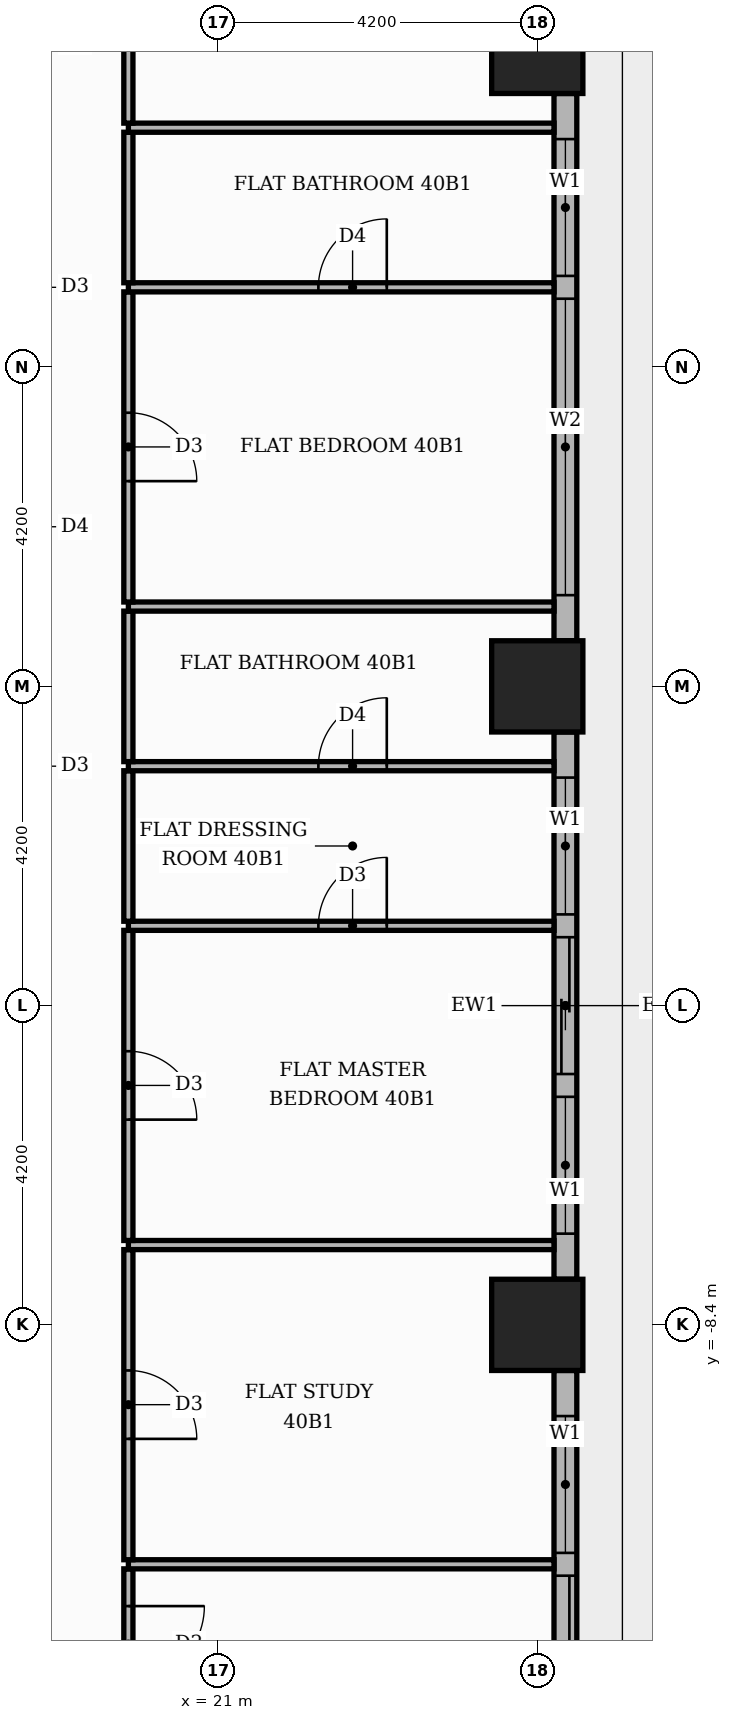
"""IFC4 building model, lengths in metres.
Left out: names, types, materials, properties, quantities, classifications, styles, units other than length and angle.
Written with IfcOpenShell. Run it as: python <this file> out.ifc"""

import sys

from ifc_helpers import new_model, si_unit, direction, frame, frame_2d, origin, origin_2d, place, context, subcontext, project, spatial, rectangle, extrude, element, fill, save


model = new_model("IFC4")
c1 = context("Model", 3, precision=1e-05, world=origin(), true_north=direction((0.0, 1.0)))
c2 = subcontext(c1, "Body", "Model", "MODEL_VIEW")
j1 = project(units=[si_unit("LENGTHUNIT", "METRE"), si_unit("PLANEANGLEUNIT", "RADIAN")], contexts=[c1])
p1 = place(None, origin())
s1 = spatial("IfcSite", under=j1, at=p1, CompositionType="ELEMENT")
p2 = place(p1, origin())
s2 = spatial("IfcBuilding", under=s1, at=p2, CompositionType="ELEMENT")
p3 = place(p2, frame((0.0, 0.0, 168.9)))
s3 = spatial("IfcBuildingStorey", under=s2, at=p3, CompositionType="ELEMENT", Elevation=168.9)
for number, where, z_axis, x_axis in (
    (1, (25.2, 0.0, 0.0), (0.0, 0.0, 1.0), (1.0, 0.0, 0.0)),
    (2, (25.2, 8.4, 0.0), (0.0, 0.0, 1.0), (1.0, 0.0, 0.0)),
    (3, (25.2, -8.4, 0.0), (0.0, 0.0, 1.0), (1.0, 0.0, 0.0)),
):
    element("IfcColumn", number, at=place(p3, frame(where, z_axis=z_axis, x_axis=x_axis)), inside=s3, PredefinedType="COLUMN", context=c2, shape_type="SweptSolid", body=[
        extrude(rectangle(XDim=1.2, YDim=1.2, at=origin_2d()), origin(), (0.0, 0.0, 1.0), 3.9),
    ])
p4 = place(p3, frame((25.57, -16.2, 0.0), z_axis=(0.0, 0.0, 1.0), x_axis=(0.0, 1.0, 0.0)))
e4 = element("IfcWall", 4, at=p4, inside=s3, PredefinedType="STANDARD", context=c2, shape_type="SweptSolid", body=[
    extrude(rectangle(XDim=7.2, YDim=0.3, at=frame_2d((3.6, 0.0))), origin(), (0.0, 0.0, 1.0), 3.48),
])
p5 = place(p4, frame((0.6, 0.0, 0.0)))
e5 = element("IfcOpeningElement", 5, at=p5, cuts=e4, PredefinedType="OPENING", context=c2, shape_type="SweptSolid", body=[
    extrude(rectangle(XDim=3.9, YDim=2.4, at=frame_2d((1.95, 1.2))), frame((0.0, 0.16, 0.0), z_axis=(0.0, -1.0, 0.0), x_axis=(1.0, 0.0, 0.0)), (0.0, 0.0, 1.0), 0.32),
])
p6 = place(p4, frame((4.8, 0.0, 0.9)))
e6 = element("IfcOpeningElement", 6, at=p6, cuts=e4, PredefinedType="OPENING", context=c2, shape_type="SweptSolid", body=[
    extrude(rectangle(XDim=1.8, YDim=2.1, at=frame_2d((0.9, 1.05))), frame((0.0, 0.16, 0.0), z_axis=(0.0, -1.0, 0.0), x_axis=(1.0, 0.0, 0.0)), (0.0, 0.0, 1.0), 0.32),
])
p7 = place(p3, frame((25.57, -7.8, 0.0), z_axis=(0.0, 0.0, 1.0), x_axis=(0.0, 1.0, 0.0)))
e7 = element("IfcWall", 7, at=p7, inside=s3, PredefinedType="STANDARD", context=c2, shape_type="SweptSolid", body=[
    extrude(rectangle(XDim=7.2, YDim=0.3, at=frame_2d((3.6, 0.0))), origin(), (0.0, 0.0, 1.0), 3.48),
])
p8 = place(p7, frame((0.6, 0.0, 0.9)))
e8 = element("IfcOpeningElement", 8, at=p8, cuts=e7, PredefinedType="OPENING", context=c2, shape_type="SweptSolid", body=[
    extrude(rectangle(XDim=1.8, YDim=2.1, at=frame_2d((0.9, 1.05))), frame((0.0, 0.16, 0.0), z_axis=(0.0, -1.0, 0.0), x_axis=(1.0, 0.0, 0.0)), (0.0, 0.0, 1.0), 0.32),
])
p9 = place(p7, frame((2.7, 0.0, 0.0)))
e9 = element("IfcOpeningElement", 9, at=p9, cuts=e7, PredefinedType="OPENING", context=c2, shape_type="SweptSolid", body=[
    extrude(rectangle(XDim=1.8, YDim=2.4, at=frame_2d((0.9, 1.2))), frame((0.0, 0.16, 0.0), z_axis=(0.0, -1.0, 0.0), x_axis=(1.0, 0.0, 0.0)), (0.0, 0.0, 1.0), 0.32),
])
p10 = place(p7, frame((4.8, 0.0, 0.9)))
e10 = element("IfcOpeningElement", 10, at=p10, cuts=e7, PredefinedType="OPENING", context=c2, shape_type="SweptSolid", body=[
    extrude(rectangle(XDim=1.8, YDim=2.1, at=frame_2d((0.9, 1.05))), frame((0.0, 0.16, 0.0), z_axis=(0.0, -1.0, 0.0), x_axis=(1.0, 0.0, 0.0)), (0.0, 0.0, 1.0), 0.32),
])
p11 = place(p3, frame((25.57, 0.6, 0.0), z_axis=(0.0, 0.0, 1.0), x_axis=(0.0, 1.0, 0.0)))
e11 = element("IfcWall", 11, at=p11, inside=s3, PredefinedType="STANDARD", context=c2, shape_type="SweptSolid", body=[
    extrude(rectangle(XDim=7.2, YDim=0.3, at=frame_2d((3.6, 0.0))), origin(), (0.0, 0.0, 1.0), 3.48),
])
p12 = place(p11, frame((0.6, 0.0, 0.9)))
e12 = element("IfcOpeningElement", 12, at=p12, cuts=e11, PredefinedType="OPENING", context=c2, shape_type="SweptSolid", body=[
    extrude(rectangle(XDim=3.9, YDim=2.1, at=frame_2d((1.95, 1.05))), frame((0.0, 0.16, 0.0), z_axis=(0.0, -1.0, 0.0), x_axis=(1.0, 0.0, 0.0)), (0.0, 0.0, 1.0), 0.32),
])
p13 = place(p11, frame((4.8, 0.0, 0.9)))
e13 = element("IfcOpeningElement", 13, at=p13, cuts=e11, PredefinedType="OPENING", context=c2, shape_type="SweptSolid", body=[
    extrude(rectangle(XDim=1.8, YDim=2.1, at=frame_2d((0.9, 1.05))), frame((0.0, 0.16, 0.0), z_axis=(0.0, -1.0, 0.0), x_axis=(1.0, 0.0, 0.0)), (0.0, 0.0, 1.0), 0.32),
])
p14 = place(p3, frame((19.82, -13.59, 0.0), z_axis=(0.0, 0.0, 1.0), x_axis=(0.0, 1.0, 0.0)))
e14 = element("IfcWall", 14, at=p14, inside=s3, PredefinedType="PARTITIONING", context=c2, shape_type="SweptSolid", body=[
    extrude(rectangle(XDim=1.98, YDim=0.12, at=frame_2d((0.99, 0.0))), origin(), (0.0, 0.0, 1.0), 3.48),
])
p15 = place(p14, frame((0.49, 0.0, 0.0)))
e15 = element("IfcOpeningElement", 15, at=p15, cuts=e14, PredefinedType="OPENING", context=c2, shape_type="SweptSolid", body=[
    extrude(rectangle(XDim=1.0, YDim=2.1, at=frame_2d((0.5, 1.05))), frame((0.0, 0.07, 0.0), z_axis=(0.0, -1.0, 0.0), x_axis=(1.0, 0.0, 0.0)), (0.0, 0.0, 1.0), 0.14),
])
p16 = place(p3, frame((19.82, -11.55, 0.0), z_axis=(0.0, 0.0, 1.0), x_axis=(1.0, 0.0, 0.0)))
e16 = element("IfcWall", 16, at=p16, inside=s3, PredefinedType="PARTITIONING", context=c2, shape_type="SweptSolid", body=[
    extrude(rectangle(XDim=5.6, YDim=0.12, at=frame_2d((2.8, 0.0))), origin(), (0.0, 0.0, 1.0), 3.48),
])
p17 = place(p3, frame((19.82, -11.49, 0.0), z_axis=(0.0, 0.0, 1.0), x_axis=(0.0, 1.0, 0.0)))
e17 = element("IfcWall", 17, at=p17, inside=s3, PredefinedType="PARTITIONING", context=c2, shape_type="SweptSolid", body=[
    extrude(rectangle(XDim=4.08, YDim=0.12, at=frame_2d((2.04, 0.0))), origin(), (0.0, 0.0, 1.0), 3.48),
])
p18 = place(p17, frame((1.59, 0.0, 0.0)))
e18 = element("IfcOpeningElement", 18, at=p18, cuts=e17, PredefinedType="OPENING", context=c2, shape_type="SweptSolid", body=[
    extrude(rectangle(XDim=0.9, YDim=2.1, at=frame_2d((0.45, 1.05))), frame((0.0, 0.07, 0.0), z_axis=(0.0, -1.0, 0.0), x_axis=(1.0, 0.0, 0.0)), (0.0, 0.0, 1.0), 0.14),
])
p19 = place(p3, frame((19.82, -7.35, 0.0), z_axis=(0.0, 0.0, 1.0), x_axis=(1.0, 0.0, 0.0)))
e19 = element("IfcWall", 19, at=p19, inside=s3, PredefinedType="PARTITIONING", context=c2, shape_type="SweptSolid", body=[
    extrude(rectangle(XDim=5.6, YDim=0.12, at=frame_2d((2.8, 0.0))), origin(), (0.0, 0.0, 1.0), 3.48),
])
p20 = place(p3, frame((19.82, -7.29, 0.0), z_axis=(0.0, 0.0, 1.0), x_axis=(0.0, 1.0, 0.0)))
e20 = element("IfcWall", 20, at=p20, inside=s3, PredefinedType="PARTITIONING", context=c2, shape_type="SweptSolid", body=[
    extrude(rectangle(XDim=4.08, YDim=0.12, at=frame_2d((2.04, 0.0))), origin(), (0.0, 0.0, 1.0), 3.48),
])
p21 = place(p20, frame((1.59, 0.0, 0.0)))
e21 = element("IfcOpeningElement", 21, at=p21, cuts=e20, PredefinedType="OPENING", context=c2, shape_type="SweptSolid", body=[
    extrude(rectangle(XDim=0.9, YDim=2.1, at=frame_2d((0.45, 1.05))), frame((0.0, 0.07, 0.0), z_axis=(0.0, -1.0, 0.0), x_axis=(1.0, 0.0, 0.0)), (0.0, 0.0, 1.0), 0.14),
])
p22 = place(p3, frame((19.82, -3.15, 0.0), z_axis=(0.0, 0.0, 1.0), x_axis=(1.0, 0.0, 0.0)))
e22 = element("IfcWall", 22, at=p22, inside=s3, PredefinedType="PARTITIONING", context=c2, shape_type="SweptSolid", body=[
    extrude(rectangle(XDim=5.6, YDim=0.12, at=frame_2d((2.8, 0.0))), origin(), (0.0, 0.0, 1.0), 3.48),
])
p23 = place(p22, frame((2.5, 0.0, 0.0)))
e23 = element("IfcOpeningElement", 23, at=p23, cuts=e22, PredefinedType="OPENING", context=c2, shape_type="SweptSolid", body=[
    extrude(rectangle(XDim=0.9, YDim=2.1, at=frame_2d((0.45, 1.05))), frame((0.0, 0.07, 0.0), z_axis=(0.0, -1.0, 0.0), x_axis=(1.0, 0.0, 0.0)), (0.0, 0.0, 1.0), 0.14),
])
p24 = place(p3, frame((19.82, -3.09, 0.0), z_axis=(0.0, 0.0, 1.0), x_axis=(0.0, 1.0, 0.0)))
e24 = element("IfcWall", 24, at=p24, inside=s3, PredefinedType="PARTITIONING", context=c2, shape_type="SweptSolid", body=[
    extrude(rectangle(XDim=1.98, YDim=0.12, at=frame_2d((0.99, 0.0))), origin(), (0.0, 0.0, 1.0), 3.48),
])
p25 = place(p3, frame((19.82, -1.05, 0.0), z_axis=(0.0, 0.0, 1.0), x_axis=(1.0, 0.0, 0.0)))
e25 = element("IfcWall", 25, at=p25, inside=s3, PredefinedType="PARTITIONING", context=c2, shape_type="SweptSolid", body=[
    extrude(rectangle(XDim=5.6, YDim=0.12, at=frame_2d((2.8, 0.0))), origin(), (0.0, 0.0, 1.0), 3.48),
])
p26 = place(p25, frame((2.5, 0.0, 0.0)))
e26 = element("IfcOpeningElement", 26, at=p26, cuts=e25, PredefinedType="OPENING", context=c2, shape_type="SweptSolid", body=[
    extrude(rectangle(XDim=0.9, YDim=2.1, at=frame_2d((0.45, 1.05))), frame((0.0, 0.07, 0.0), z_axis=(0.0, -1.0, 0.0), x_axis=(1.0, 0.0, 0.0)), (0.0, 0.0, 1.0), 0.14),
])
p27 = place(p3, frame((19.82, -0.99, 0.0), z_axis=(0.0, 0.0, 1.0), x_axis=(0.0, 1.0, 0.0)))
e27 = element("IfcWall", 27, at=p27, inside=s3, PredefinedType="PARTITIONING", context=c2, shape_type="SweptSolid", body=[
    extrude(rectangle(XDim=1.98, YDim=0.12, at=frame_2d((0.99, 0.0))), origin(), (0.0, 0.0, 1.0), 3.48),
])
p28 = place(p3, frame((19.82, 1.05, 0.0), z_axis=(0.0, 0.0, 1.0), x_axis=(1.0, 0.0, 0.0)))
e28 = element("IfcWall", 28, at=p28, inside=s3, PredefinedType="PARTITIONING", context=c2, shape_type="SweptSolid", body=[
    extrude(rectangle(XDim=5.6, YDim=0.12, at=frame_2d((2.8, 0.0))), origin(), (0.0, 0.0, 1.0), 3.48),
])
p29 = place(p3, frame((19.82, 1.11, 0.0), z_axis=(0.0, 0.0, 1.0), x_axis=(0.0, 1.0, 0.0)))
e29 = element("IfcWall", 29, at=p29, inside=s3, PredefinedType="PARTITIONING", context=c2, shape_type="SweptSolid", body=[
    extrude(rectangle(XDim=4.08, YDim=0.12, at=frame_2d((2.04, 0.0))), origin(), (0.0, 0.0, 1.0), 3.48),
])
p30 = place(p29, frame((1.59, 0.0, 0.0)))
e30 = element("IfcOpeningElement", 30, at=p30, cuts=e29, PredefinedType="OPENING", context=c2, shape_type="SweptSolid", body=[
    extrude(rectangle(XDim=0.9, YDim=2.1, at=frame_2d((0.45, 1.05))), frame((0.0, 0.07, 0.0), z_axis=(0.0, -1.0, 0.0), x_axis=(1.0, 0.0, 0.0)), (0.0, 0.0, 1.0), 0.14),
])
p31 = place(p3, frame((19.82, 5.25, 0.0), z_axis=(0.0, 0.0, 1.0), x_axis=(1.0, 0.0, 0.0)))
e31 = element("IfcWall", 31, at=p31, inside=s3, PredefinedType="PARTITIONING", context=c2, shape_type="SweptSolid", body=[
    extrude(rectangle(XDim=5.6, YDim=0.12, at=frame_2d((2.8, 0.0))), origin(), (0.0, 0.0, 1.0), 3.48),
])
p32 = place(p31, frame((2.5, 0.0, 0.0)))
e32 = element("IfcOpeningElement", 32, at=p32, cuts=e31, PredefinedType="OPENING", context=c2, shape_type="SweptSolid", body=[
    extrude(rectangle(XDim=0.9, YDim=2.1, at=frame_2d((0.45, 1.05))), frame((0.0, 0.07, 0.0), z_axis=(0.0, -1.0, 0.0), x_axis=(1.0, 0.0, 0.0)), (0.0, 0.0, 1.0), 0.14),
])
p33 = place(p3, frame((19.82, 5.31, 0.0), z_axis=(0.0, 0.0, 1.0), x_axis=(0.0, 1.0, 0.0)))
e33 = element("IfcWall", 33, at=p33, inside=s3, PredefinedType="PARTITIONING", context=c2, shape_type="SweptSolid", body=[
    extrude(rectangle(XDim=1.98, YDim=0.12, at=frame_2d((0.99, 0.0))), origin(), (0.0, 0.0, 1.0), 3.48),
])
p34 = place(p3, frame((19.82, 7.35, 0.0), z_axis=(0.0, 0.0, 1.0), x_axis=(1.0, 0.0, 0.0)))
e34 = element("IfcWall", 34, at=p34, inside=s3, PredefinedType="PARTITIONING", context=c2, shape_type="SweptSolid", body=[
    extrude(rectangle(XDim=5.6, YDim=0.12, at=frame_2d((2.8, 0.0))), origin(), (0.0, 0.0, 1.0), 3.48),
])
p35 = place(p3, frame((19.82, 7.41, 0.0), z_axis=(0.0, 0.0, 1.0), x_axis=(0.0, 1.0, 0.0)))
e35 = element("IfcWall", 35, at=p35, inside=s3, PredefinedType="PARTITIONING", context=c2, shape_type="SweptSolid", body=[
    extrude(rectangle(XDim=4.08, YDim=0.12, at=frame_2d((2.04, 0.0))), origin(), (0.0, 0.0, 1.0), 3.48),
])
p36 = place(p35, frame((1.59, 0.0, 0.0)))
e36 = element("IfcOpeningElement", 36, at=p36, cuts=e35, PredefinedType="OPENING", context=c2, shape_type="SweptSolid", body=[
    extrude(rectangle(XDim=0.9, YDim=2.1, at=frame_2d((0.45, 1.05))), frame((0.0, 0.07, 0.0), z_axis=(0.0, -1.0, 0.0), x_axis=(1.0, 0.0, 0.0)), (0.0, 0.0, 1.0), 0.14),
])
p37 = place(p5, origin())
e37 = element("IfcDoor", 37, at=p37, inside=s3, OperationType="SLIDING_TO_LEFT", PredefinedType="DOOR", context=c2, shape_type="SweptSolid", body=[
    extrude(rectangle(XDim=3.9, YDim=2.4, at=frame_2d((1.95, 1.2))), frame((0.0, 0.025, 0.0), z_axis=(0.0, -1.0, 0.0), x_axis=(1.0, 0.0, 0.0)), (0.0, 0.0, 1.0), 0.05),
])
fill(e5, e37)
p38 = place(p6, origin())
e38 = element("IfcWindow", 38, at=p38, inside=s3, PartitioningType="SINGLE_PANEL", PredefinedType="WINDOW", context=c2, shape_type="SweptSolid", body=[
    extrude(rectangle(XDim=1.8, YDim=2.1, at=frame_2d((0.9, 1.05))), frame((0.0, 0.03, 0.0), z_axis=(0.0, -1.0, 0.0), x_axis=(1.0, 0.0, 0.0)), (0.0, 0.0, 1.0), 0.06),
])
fill(e6, e38)
p39 = place(p8, origin())
e39 = element("IfcWindow", 39, at=p39, inside=s3, PartitioningType="SINGLE_PANEL", PredefinedType="WINDOW", context=c2, shape_type="SweptSolid", body=[
    extrude(rectangle(XDim=1.8, YDim=2.1, at=frame_2d((0.9, 1.05))), frame((0.0, 0.03, 0.0), z_axis=(0.0, -1.0, 0.0), x_axis=(1.0, 0.0, 0.0)), (0.0, 0.0, 1.0), 0.06),
])
fill(e8, e39)
p40 = place(p9, origin())
e40 = element("IfcDoor", 40, at=p40, inside=s3, OperationType="SLIDING_TO_LEFT", PredefinedType="DOOR", context=c2, shape_type="SweptSolid", body=[
    extrude(rectangle(XDim=1.8, YDim=2.4, at=frame_2d((0.9, 1.2))), frame((0.0, 0.025, 0.0), z_axis=(0.0, -1.0, 0.0), x_axis=(1.0, 0.0, 0.0)), (0.0, 0.0, 1.0), 0.05),
])
fill(e9, e40)
p41 = place(p10, origin())
e41 = element("IfcWindow", 41, at=p41, inside=s3, PartitioningType="SINGLE_PANEL", PredefinedType="WINDOW", context=c2, shape_type="SweptSolid", body=[
    extrude(rectangle(XDim=1.8, YDim=2.1, at=frame_2d((0.9, 1.05))), frame((0.0, 0.03, 0.0), z_axis=(0.0, -1.0, 0.0), x_axis=(1.0, 0.0, 0.0)), (0.0, 0.0, 1.0), 0.06),
])
fill(e10, e41)
p42 = place(p12, origin())
e42 = element("IfcWindow", 42, at=p42, inside=s3, PartitioningType="SINGLE_PANEL", PredefinedType="WINDOW", context=c2, shape_type="SweptSolid", body=[
    extrude(rectangle(XDim=3.9, YDim=2.1, at=frame_2d((1.95, 1.05))), frame((0.0, 0.03, 0.0), z_axis=(0.0, -1.0, 0.0), x_axis=(1.0, 0.0, 0.0)), (0.0, 0.0, 1.0), 0.06),
])
fill(e12, e42)
p43 = place(p13, origin())
e43 = element("IfcWindow", 43, at=p43, inside=s3, PartitioningType="SINGLE_PANEL", PredefinedType="WINDOW", context=c2, shape_type="SweptSolid", body=[
    extrude(rectangle(XDim=1.8, YDim=2.1, at=frame_2d((0.9, 1.05))), frame((0.0, 0.03, 0.0), z_axis=(0.0, -1.0, 0.0), x_axis=(1.0, 0.0, 0.0)), (0.0, 0.0, 1.0), 0.06),
])
fill(e13, e43)
p44 = place(p15, frame((1.0, 0.0, 0.0), z_axis=(0.0, 0.0, 1.0), x_axis=(-1.0, 0.0, 0.0)))
e44 = element("IfcDoor", 44, at=p44, inside=s3, OperationType="SINGLE_SWING_RIGHT", PredefinedType="DOOR", context=c2, shape_type="SweptSolid", body=[
    extrude(rectangle(XDim=1.0, YDim=2.1, at=frame_2d((0.5, 1.05))), frame((0.0, 0.025, 0.0), z_axis=(0.0, -1.0, 0.0), x_axis=(1.0, 0.0, 0.0)), (0.0, 0.0, 1.0), 0.05),
])
fill(e15, e44)
p45 = place(p18, frame((0.9, 0.0, 0.0), z_axis=(0.0, 0.0, 1.0), x_axis=(-1.0, 0.0, 0.0)))
e45 = element("IfcDoor", 45, at=p45, inside=s3, OperationType="SINGLE_SWING_LEFT", PredefinedType="DOOR", context=c2, shape_type="SweptSolid", body=[
    extrude(rectangle(XDim=0.9, YDim=2.1, at=frame_2d((0.45, 1.05))), frame((0.0, 0.025, 0.0), z_axis=(0.0, -1.0, 0.0), x_axis=(1.0, 0.0, 0.0)), (0.0, 0.0, 1.0), 0.05),
])
fill(e18, e45)
p46 = place(p21, frame((0.9, 0.0, 0.0), z_axis=(0.0, 0.0, 1.0), x_axis=(-1.0, 0.0, 0.0)))
e46 = element("IfcDoor", 46, at=p46, inside=s3, OperationType="SINGLE_SWING_LEFT", PredefinedType="DOOR", context=c2, shape_type="SweptSolid", body=[
    extrude(rectangle(XDim=0.9, YDim=2.1, at=frame_2d((0.45, 1.05))), frame((0.0, 0.025, 0.0), z_axis=(0.0, -1.0, 0.0), x_axis=(1.0, 0.0, 0.0)), (0.0, 0.0, 1.0), 0.05),
])
fill(e21, e46)
p47 = place(p23, origin())
e47 = element("IfcDoor", 47, at=p47, inside=s3, OperationType="SINGLE_SWING_RIGHT", PredefinedType="DOOR", context=c2, shape_type="SweptSolid", body=[
    extrude(rectangle(XDim=0.9, YDim=2.1, at=frame_2d((0.45, 1.05))), frame((0.0, 0.025, 0.0), z_axis=(0.0, -1.0, 0.0), x_axis=(1.0, 0.0, 0.0)), (0.0, 0.0, 1.0), 0.05),
])
fill(e23, e47)
p48 = place(p26, origin())
e48 = element("IfcDoor", 48, at=p48, inside=s3, OperationType="SINGLE_SWING_RIGHT", PredefinedType="DOOR", context=c2, shape_type="SweptSolid", body=[
    extrude(rectangle(XDim=0.9, YDim=2.1, at=frame_2d((0.45, 1.05))), frame((0.0, 0.025, 0.0), z_axis=(0.0, -1.0, 0.0), x_axis=(1.0, 0.0, 0.0)), (0.0, 0.0, 1.0), 0.05),
])
fill(e26, e48)
p49 = place(p30, frame((0.9, 0.0, 0.0), z_axis=(0.0, 0.0, 1.0), x_axis=(-1.0, 0.0, 0.0)))
e49 = element("IfcDoor", 49, at=p49, inside=s3, OperationType="SINGLE_SWING_LEFT", PredefinedType="DOOR", context=c2, shape_type="SweptSolid", body=[
    extrude(rectangle(XDim=0.9, YDim=2.1, at=frame_2d((0.45, 1.05))), frame((0.0, 0.025, 0.0), z_axis=(0.0, -1.0, 0.0), x_axis=(1.0, 0.0, 0.0)), (0.0, 0.0, 1.0), 0.05),
])
fill(e30, e49)
p50 = place(p32, origin())
e50 = element("IfcDoor", 50, at=p50, inside=s3, OperationType="SINGLE_SWING_RIGHT", PredefinedType="DOOR", context=c2, shape_type="SweptSolid", body=[
    extrude(rectangle(XDim=0.9, YDim=2.1, at=frame_2d((0.45, 1.05))), frame((0.0, 0.025, 0.0), z_axis=(0.0, -1.0, 0.0), x_axis=(1.0, 0.0, 0.0)), (0.0, 0.0, 1.0), 0.05),
])
fill(e32, e50)
save(model, sys.argv[1])
